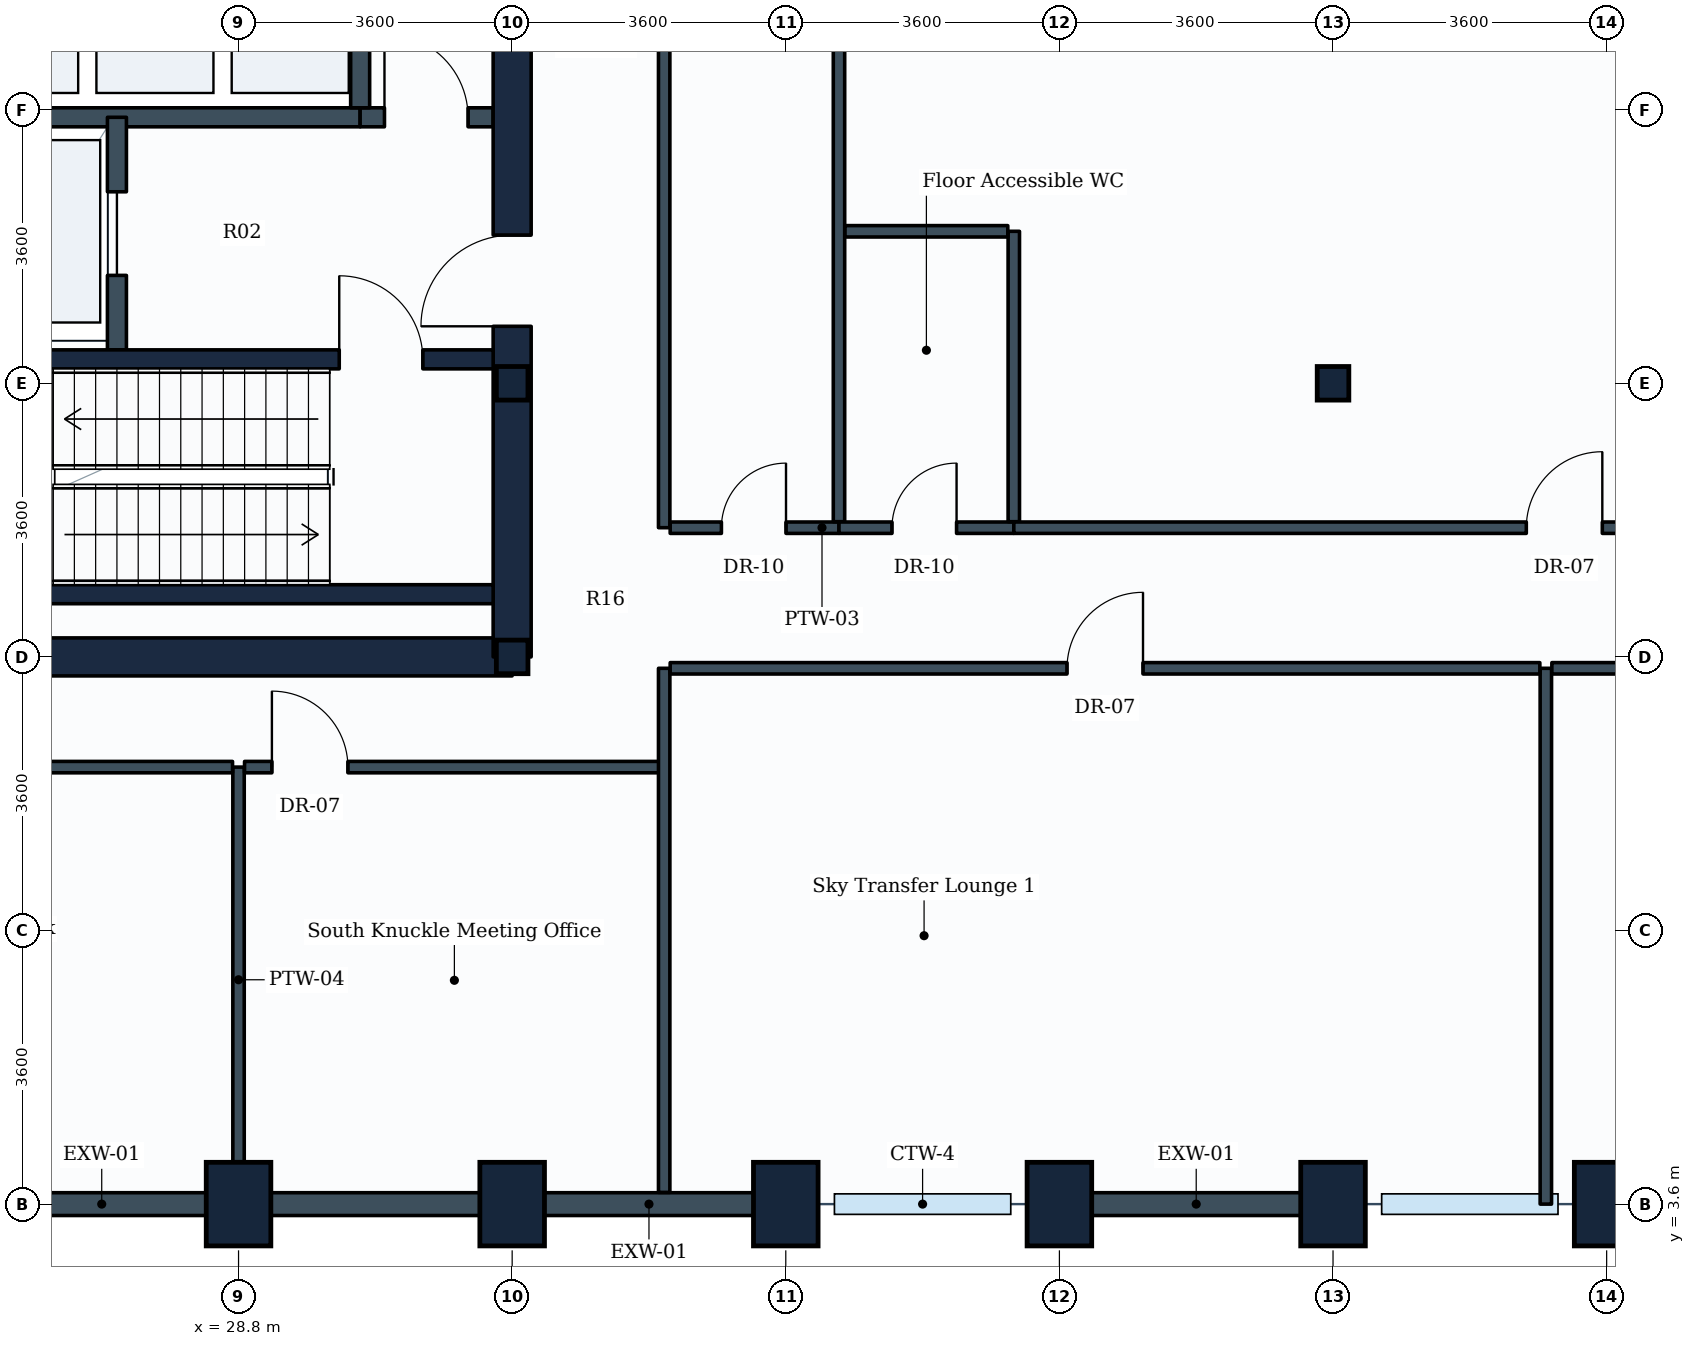
"""IFC4 building model, lengths in metres.
Left out: names, types, materials, properties, quantities, classifications, styles, units other than length and angle.
Written with IfcOpenShell. Run it as: python <this file> out.ifc"""

import sys

from ifc_helpers import new_model, si_unit, direction, frame, frame_2d, origin, origin_2d, place, context, subcontext, project, spatial, rectangle, i_section, extrude, element, fill, save


model = new_model("IFC4")
c1 = context("Model", 3, precision=1e-05, world=origin(), true_north=direction((0.0, 1.0)))
c2 = subcontext(c1, "Body", "Model", "MODEL_VIEW")
j1 = project(units=[si_unit("LENGTHUNIT", "METRE"), si_unit("PLANEANGLEUNIT", "RADIAN")], contexts=[c1])
p1 = place(None, origin())
s1 = spatial("IfcSite", under=j1, at=p1, CompositionType="ELEMENT")
p2 = place(p1, origin())
s2 = spatial("IfcBuilding", under=s1, at=p2, CompositionType="ELEMENT")
p3 = place(p2, frame((0.0, 0.0, 115.2)))
s3 = spatial("IfcBuildingStorey", under=s2, at=p3, CompositionType="ELEMENT", Elevation=115.2)
for number, where, z_axis, x_axis in (
    (1, (28.8, 3.6, 0.0), (0.0, 0.0, 1.0), (1.0, 0.0, 0.0)),
    (2, (32.4, 3.6, 0.0), (0.0, 0.0, 1.0), (1.0, 0.0, 0.0)),
):
    element("IfcColumn", number, at=place(p3, frame(where, z_axis=z_axis, x_axis=x_axis)), inside=s3, PredefinedType="COLUMN", context=c2, shape_type="SweptSolid", body=[
        extrude(rectangle(XDim=0.85, YDim=1.1, at=origin_2d()), origin(), (0.0, 0.0, 1.0), 4.8),
    ])
for number, where, z_axis, x_axis in (
    (3, (32.4, 10.8, 0.0), (0.0, 0.0, 1.0), (1.0, 0.0, 0.0)),
    (4, (32.4, 14.4, 0.0), (0.0, 0.0, 1.0), (1.0, 0.0, 0.0)),
):
    element("IfcColumn", number, at=place(p3, frame(where, z_axis=z_axis, x_axis=x_axis)), inside=s3, PredefinedType="COLUMN", context=c2, shape_type="SweptSolid", body=[
        extrude(i_section(OverallWidth=0.416, OverallDepth=0.442, WebThickness=0.025, FlangeThickness=0.041, FilletRadius=0.015, at=origin_2d()), origin(), (0.0, 0.0, 1.0), 4.8),
    ])
for number, where, z_axis, x_axis in (
    (5, (36.0, 3.6, 0.0), (0.0, 0.0, 1.0), (1.0, 0.0, 0.0)),
    (6, (39.6, 3.6, 0.0), (0.0, 0.0, 1.0), (1.0, 0.0, 0.0)),
    (7, (43.2, 3.6, 0.0), (0.0, 0.0, 1.0), (1.0, 0.0, 0.0)),
):
    element("IfcColumn", number, at=place(p3, frame(where, z_axis=z_axis, x_axis=x_axis)), inside=s3, PredefinedType="COLUMN", context=c2, shape_type="SweptSolid", body=[
        extrude(rectangle(XDim=0.85, YDim=1.1, at=origin_2d()), origin(), (0.0, 0.0, 1.0), 4.8),
    ])
p4 = place(p3, frame((43.2, 14.4, 0.0), z_axis=(0.0, 0.0, 1.0), x_axis=(1.0, 0.0, 0.0)))
e8 = element("IfcColumn", 8, at=p4, inside=s3, PredefinedType="COLUMN", context=c2, shape_type="SweptSolid", body=[
    extrude(i_section(OverallWidth=0.416, OverallDepth=0.442, WebThickness=0.025, FlangeThickness=0.041, FilletRadius=0.015, at=origin_2d()), origin(), (0.0, 0.0, 1.0), 4.8),
])
p5 = place(p3, frame((46.8, 3.6, 0.0), z_axis=(0.0, 0.0, 1.0), x_axis=(1.0, 0.0, 0.0)))
e9 = element("IfcColumn", 9, at=p5, inside=s3, PredefinedType="COLUMN", context=c2, shape_type="SweptSolid", body=[
    extrude(rectangle(XDim=0.85, YDim=1.1, at=origin_2d()), origin(), (0.0, 0.0, 1.0), 4.8),
])
p6 = place(p3, frame((28.8, 3.6, 0.0), z_axis=(0.0, 0.0, 1.0), x_axis=(-1.0, 0.0, 0.0)))
e10 = element("IfcWall", 10, at=p6, inside=s3, PredefinedType="STANDARD", context=c2, shape_type="SweptSolid", body=[
    extrude(rectangle(XDim=3.6, YDim=0.3, at=frame_2d((1.8, 0.0))), origin(), (0.0, 0.0, 1.0), 3.93),
])
p7 = place(p3, frame((32.4, 3.6, 0.0), z_axis=(0.0, 0.0, 1.0), x_axis=(-1.0, 0.0, 0.0)))
e11 = element("IfcWall", 11, at=p7, inside=s3, PredefinedType="STANDARD", context=c2, shape_type="SweptSolid", body=[
    extrude(rectangle(XDim=3.6, YDim=0.3, at=frame_2d((1.8, 0.0))), origin(), (0.0, 0.0, 1.0), 3.93),
])
p8 = place(p3, frame((36.0, 3.6, 0.0), z_axis=(0.0, 0.0, 1.0), x_axis=(-1.0, 0.0, 0.0)))
e12 = element("IfcWall", 12, at=p8, inside=s3, PredefinedType="STANDARD", context=c2, shape_type="SweptSolid", body=[
    extrude(rectangle(XDim=3.6, YDim=0.3, at=frame_2d((1.8, 0.0))), origin(), (0.0, 0.0, 1.0), 3.93),
])
for number, where, z_axis, x_axis in (
    (13, (43.2, 3.6, 0.0), (0.0, 0.0, 1.0), (-1.0, 0.0, 0.0)),
    (14, (50.4, 3.6, 0.0), (0.0, 0.0, 1.0), (-1.0, 0.0, 0.0)),
):
    element("IfcWall", number, at=place(p3, frame(where, z_axis=z_axis, x_axis=x_axis)), inside=s3, PredefinedType="STANDARD", context=c2, shape_type="SweptSolid", body=[
        extrude(rectangle(XDim=3.6, YDim=0.3, at=frame_2d((1.8, 0.0))), origin(), (0.0, 0.0, 1.0), 3.93),
    ])
p9 = place(p3, frame((14.4, 10.8, 0.0), z_axis=(0.0, 0.0, 1.0), x_axis=(1.0, 0.0, 0.0)))
e15 = element("IfcWall", 15, at=p9, inside=s3, PredefinedType="SHEAR", context=c2, shape_type="SweptSolid", body=[
    extrude(rectangle(XDim=18.0, YDim=0.5, at=frame_2d((9.0, 0.0))), origin(), (0.0, 0.0, 1.0), 4.55),
])
p10 = place(p3, frame((32.4, 10.8, 0.0), z_axis=(0.0, 0.0, 1.0), x_axis=(0.0, 1.0, 0.0)))
e16 = element("IfcWall", 16, at=p10, inside=s3, PredefinedType="SHEAR", context=c2, shape_type="SweptSolid", body=[
    extrude(rectangle(XDim=14.4, YDim=0.5, at=frame_2d((7.2, 0.0))), origin(), (0.0, 0.0, 1.0), 4.55),
])
p11 = place(p10, frame((4.35, 0.0, 0.0)))
e17 = element("IfcOpeningElement", 17, at=p11, cuts=e16, PredefinedType="OPENING", context=c2, shape_type="SweptSolid", body=[
    extrude(rectangle(XDim=1.2, YDim=2.1, at=frame_2d((0.6, 1.05))), frame((0.0, 0.26, 0.0), z_axis=(0.0, -1.0, 0.0), x_axis=(1.0, 0.0, 0.0)), (0.0, 0.0, 1.0), 0.52),
])
p12 = place(p10, frame((10.0, 0.0, 0.0)))
e18 = element("IfcOpeningElement", 18, at=p12, cuts=e16, PredefinedType="OPENING", context=c2, shape_type="SweptSolid", body=[
    extrude(rectangle(XDim=1.2, YDim=2.1, at=frame_2d((0.6, 1.05))), frame((0.0, 0.26, 0.0), z_axis=(0.0, -1.0, 0.0), x_axis=(1.0, 0.0, 0.0)), (0.0, 0.0, 1.0), 0.52),
])
p13 = place(p3, frame((23.35, 11.625, 0.0), z_axis=(0.0, 0.0, 1.0), x_axis=(1.0, 0.0, 0.0)))
e19 = element("IfcWall", 19, at=p13, inside=s3, PredefinedType="SHEAR", context=c2, shape_type="SweptSolid", body=[
    extrude(rectangle(XDim=8.8, YDim=0.25, at=frame_2d((4.4, 0.0))), origin(), (0.0, 0.0, 1.0), 4.55),
])
p14 = place(p3, frame((23.35, 14.715, 0.0), z_axis=(0.0, 0.0, 1.0), x_axis=(1.0, 0.0, 0.0)))
e20 = element("IfcWall", 20, at=p14, inside=s3, PredefinedType="SHEAR", context=c2, shape_type="SweptSolid", body=[
    extrude(rectangle(XDim=8.8, YDim=0.25, at=frame_2d((4.4, 0.0))), origin(), (0.0, 0.0, 1.0), 4.55),
])
p15 = place(p14, frame((6.775, 0.0, 0.0)))
e21 = element("IfcOpeningElement", 21, at=p15, cuts=e20, PredefinedType="OPENING", context=c2, shape_type="SweptSolid", body=[
    extrude(rectangle(XDim=1.1, YDim=2.1, at=frame_2d((0.55, 1.05))), frame((0.0, 0.135, 0.0), z_axis=(0.0, -1.0, 0.0), x_axis=(1.0, 0.0, 0.0)), (0.0, 0.0, 1.0), 0.27),
])
p16 = place(p3, frame((21.88, 17.9, 0.0), z_axis=(0.0, 0.0, 1.0), x_axis=(1.0, 0.0, 0.0)))
e22 = element("IfcWall", 22, at=p16, inside=s3, PredefinedType="PARTITIONING", context=c2, shape_type="SweptSolid", body=[
    extrude(rectangle(XDim=8.52, YDim=0.25, at=frame_2d((4.26, 0.0))), origin(), (0.0, 0.0, 1.0), 4.535),
])
p17 = place(p3, frame((30.4, 17.9, 0.0), z_axis=(0.0, 0.0, 1.0), x_axis=(1.0, 0.0, 0.0)))
e23 = element("IfcWall", 23, at=p17, inside=s3, PredefinedType="PARTITIONING", context=c2, shape_type="SweptSolid", body=[
    extrude(rectangle(XDim=1.75, YDim=0.25, at=frame_2d((0.875, 0.0))), origin(), (0.0, 0.0, 1.0), 4.535),
])
p18 = place(p17, frame((0.32, 0.0, 0.0)))
e24 = element("IfcOpeningElement", 24, at=p18, cuts=e23, PredefinedType="OPENING", context=c2, shape_type="SweptSolid", body=[
    extrude(rectangle(XDim=1.1, YDim=2.1, at=frame_2d((0.55, 1.05))), frame((0.0, 0.135, 0.0), z_axis=(0.0, -1.0, 0.0), x_axis=(1.0, 0.0, 0.0)), (0.0, 0.0, 1.0), 0.27),
])
p19 = place(p3, frame((27.2, 14.84, 0.0), z_axis=(0.0, 0.0, 1.0), x_axis=(0.0, 1.0, 0.0)))
e25 = element("IfcWall", 25, at=p19, inside=s3, PredefinedType="PARTITIONING", context=c2, shape_type="SweptSolid", body=[
    extrude(rectangle(XDim=3.06, YDim=0.25, at=frame_2d((1.53, 0.0))), origin(), (0.0, 0.0, 1.0), 4.535),
])
p20 = place(p19, frame((0.98, 0.0, 0.0)))
e26 = element("IfcOpeningElement", 26, at=p20, cuts=e25, PredefinedType="OPENING", context=c2, shape_type="SweptSolid", body=[
    extrude(rectangle(XDim=1.1, YDim=2.1, at=frame_2d((0.55, 1.05))), frame((0.0, 0.135, 0.0), z_axis=(0.0, -1.0, 0.0), x_axis=(1.0, 0.0, 0.0)), (0.0, 0.0, 1.0), 0.27),
])
p21 = place(p3, frame((30.4, 18.025, 0.0), z_axis=(0.0, 0.0, 1.0), x_axis=(0.0, 1.0, 0.0)))
e27 = element("IfcWall", 27, at=p21, inside=s3, PredefinedType="PARTITIONING", context=c2, shape_type="SweptSolid", body=[
    extrude(rectangle(XDim=2.27, YDim=0.25, at=frame_2d((1.135, 0.0))), origin(), (0.0, 0.0, 1.0), 4.535),
])
p22 = place(p3, frame((34.4, 12.5, 0.0), z_axis=(0.0, 0.0, 1.0), x_axis=(0.0, 1.0, 0.0)))
e28 = element("IfcWall", 28, at=p22, inside=s3, PredefinedType="PARTITIONING", context=c2, shape_type="SweptSolid", body=[
    extrude(rectangle(XDim=12.7, YDim=0.15, at=frame_2d((6.35, 0.0))), origin(), (0.0, 0.0, 1.0), 3.93),
])
p23 = place(p3, frame((34.479, 12.5, 0.0), z_axis=(0.0, 0.0, 1.0), x_axis=(1.0, 0.0, 0.0)))
e29 = element("IfcWall", 29, at=p23, inside=s3, PredefinedType="PARTITIONING", context=c2, shape_type="SweptSolid", body=[
    extrude(rectangle(XDim=2.221, YDim=0.15, at=frame_2d((1.11, 0.0))), origin(), (0.0, 0.0, 1.0), 4.08),
])
p24 = place(p23, frame((0.674, 0.0, 0.0)))
e30 = element("IfcOpeningElement", 30, at=p24, cuts=e29, PredefinedType="OPENING", context=c2, shape_type="SweptSolid", body=[
    extrude(rectangle(XDim=0.85, YDim=2.1, at=frame_2d((0.425, 1.05))), frame((0.0, 0.085, 0.0), z_axis=(0.0, -1.0, 0.0), x_axis=(1.0, 0.0, 0.0)), (0.0, 0.0, 1.0), 0.17),
])
p25 = place(p3, frame((36.7, 12.579, 0.0), z_axis=(0.0, 0.0, 1.0), x_axis=(0.0, 1.0, 0.0)))
e31 = element("IfcWall", 31, at=p25, inside=s3, PredefinedType="PARTITIONING", context=c2, shape_type="SweptSolid", body=[
    extrude(rectangle(XDim=12.467, YDim=0.15, at=frame_2d((6.233, 0.0))), origin(), (0.0, 0.0, 1.0), 3.93),
])
p26 = place(p3, frame((36.7, 12.5, 0.0), z_axis=(0.0, 0.0, 1.0), x_axis=(1.0, 0.0, 0.0)))
e32 = element("IfcWall", 32, at=p26, inside=s3, PredefinedType="PARTITIONING", context=c2, shape_type="SweptSolid", body=[
    extrude(rectangle(XDim=2.3, YDim=0.15, at=frame_2d((1.15, 0.0))), origin(), (0.0, 0.0, 1.0), 4.535),
])
p27 = place(p26, frame((0.697, 0.0, 0.0)))
e33 = element("IfcOpeningElement", 33, at=p27, cuts=e32, PredefinedType="OPENING", context=c2, shape_type="SweptSolid", body=[
    extrude(rectangle(XDim=0.85, YDim=2.1, at=frame_2d((0.425, 1.05))), frame((0.0, 0.085, 0.0), z_axis=(0.0, -1.0, 0.0), x_axis=(1.0, 0.0, 0.0)), (0.0, 0.0, 1.0), 0.17),
])
p28 = place(p3, frame((39.0, 12.579, 0.0), z_axis=(0.0, 0.0, 1.0), x_axis=(0.0, 1.0, 0.0)))
e34 = element("IfcWall", 34, at=p28, inside=s3, PredefinedType="PARTITIONING", context=c2, shape_type="SweptSolid", body=[
    extrude(rectangle(XDim=3.821, YDim=0.15, at=frame_2d((1.91, 0.0))), origin(), (0.0, 0.0, 1.0), 4.08),
])
p29 = place(p3, frame((36.779, 16.4, 0.0), z_axis=(0.0, 0.0, 1.0), x_axis=(1.0, 0.0, 0.0)))
e35 = element("IfcWall", 35, at=p29, inside=s3, PredefinedType="PARTITIONING", context=c2, shape_type="SweptSolid", body=[
    extrude(rectangle(XDim=2.142, YDim=0.15, at=frame_2d((1.071, 0.0))), origin(), (0.0, 0.0, 1.0), 4.535),
])
p30 = place(p3, frame((28.8, 9.35, 0.0), z_axis=(0.0, 0.0, 1.0), x_axis=(0.0, -1.0, 0.0)))
e36 = element("IfcWall", 36, at=p30, inside=s3, PredefinedType="PARTITIONING", context=c2, shape_type="SweptSolid", body=[
    extrude(rectangle(XDim=5.596, YDim=0.15, at=frame_2d((2.798, 0.0))), origin(), (0.0, 0.0, 1.0), 4.535),
])
p31 = place(p3, frame((13.08, 9.35, 0.0), z_axis=(0.0, 0.0, 1.0), x_axis=(1.0, 0.0, 0.0)))
e37 = element("IfcWall", 37, at=p31, inside=s3, PredefinedType="PARTITIONING", context=c2, shape_type="SweptSolid", body=[
    extrude(rectangle(XDim=15.641, YDim=0.15, at=frame_2d((7.82, 0.0))), origin(), (0.0, 0.0, 1.0), 4.08),
])
p32 = place(p31, frame((4.706, 0.0, 0.0)))
e38 = element("IfcOpeningElement", 38, at=p32, cuts=e37, PredefinedType="OPENING", context=c2, shape_type="SweptSolid", body=[
    extrude(rectangle(XDim=1.0, YDim=2.1, at=frame_2d((0.5, 1.05))), frame((0.0, 0.085, 0.0), z_axis=(0.0, -1.0, 0.0), x_axis=(1.0, 0.0, 0.0)), (0.0, 0.0, 1.0), 0.17),
])
p33 = place(p3, frame((28.879, 9.35, 0.0), z_axis=(0.0, 0.0, 1.0), x_axis=(1.0, 0.0, 0.0)))
e39 = element("IfcWall", 39, at=p33, inside=s3, PredefinedType="PARTITIONING", context=c2, shape_type="SweptSolid", body=[
    extrude(rectangle(XDim=5.521, YDim=0.15, at=frame_2d((2.76, 0.0))), origin(), (0.0, 0.0, 1.0), 4.535),
])
p34 = place(p33, frame((0.36, 0.0, 0.0)))
e40 = element("IfcOpeningElement", 40, at=p34, cuts=e39, PredefinedType="OPENING", context=c2, shape_type="SweptSolid", body=[
    extrude(rectangle(XDim=1.0, YDim=2.1, at=frame_2d((0.5, 1.05))), frame((0.0, 0.085, 0.0), z_axis=(0.0, -1.0, 0.0), x_axis=(1.0, 0.0, 0.0)), (0.0, 0.0, 1.0), 0.17),
])
p35 = place(p3, frame((34.4, 3.754, 0.0), z_axis=(0.0, 0.0, 1.0), x_axis=(0.0, 1.0, 0.0)))
e41 = element("IfcWall", 41, at=p35, inside=s3, PredefinedType="PARTITIONING", context=c2, shape_type="SweptSolid", body=[
    extrude(rectangle(XDim=6.896, YDim=0.15, at=frame_2d((3.448, 0.0))), origin(), (0.0, 0.0, 1.0), 3.93),
])
p36 = place(p3, frame((46.0, 3.6, 0.0), z_axis=(0.0, 0.0, 1.0), x_axis=(0.0, 1.0, 0.0)))
e42 = element("IfcWall", 42, at=p36, inside=s3, PredefinedType="PARTITIONING", context=c2, shape_type="SweptSolid", body=[
    extrude(rectangle(XDim=7.05, YDim=0.15, at=frame_2d((3.525, 0.0))), origin(), (0.0, 0.0, 1.0), 3.93),
])
p37 = place(p3, frame((34.479, 10.65, 0.0), z_axis=(0.0, 0.0, 1.0), x_axis=(1.0, 0.0, 0.0)))
e43 = element("IfcWall", 43, at=p37, inside=s3, PredefinedType="PARTITIONING", context=c2, shape_type="SweptSolid", body=[
    extrude(rectangle(XDim=11.442, YDim=0.15, at=frame_2d((5.721, 0.0))), origin(), (0.0, 0.0, 1.0), 4.08),
])
p38 = place(p37, frame((5.221, 0.0, 0.0)))
e44 = element("IfcOpeningElement", 44, at=p38, cuts=e43, PredefinedType="OPENING", context=c2, shape_type="SweptSolid", body=[
    extrude(rectangle(XDim=1.0, YDim=2.1, at=frame_2d((0.5, 1.05))), frame((0.0, 0.085, 0.0), z_axis=(0.0, -1.0, 0.0), x_axis=(1.0, 0.0, 0.0)), (0.0, 0.0, 1.0), 0.17),
])
p39 = place(p3, frame((46.079, 10.65, 0.0), z_axis=(0.0, 0.0, 1.0), x_axis=(1.0, 0.0, 0.0)))
e45 = element("IfcWall", 45, at=p39, inside=s3, PredefinedType="PARTITIONING", context=c2, shape_type="SweptSolid", body=[
    extrude(rectangle(XDim=11.367, YDim=0.15, at=frame_2d((5.684, 0.0))), origin(), (0.0, 0.0, 1.0), 3.93),
])
p40 = place(p39, frame((5.221, 0.0, 0.0)))
e46 = element("IfcOpeningElement", 46, at=p40, cuts=e45, PredefinedType="OPENING", context=c2, shape_type="SweptSolid", body=[
    extrude(rectangle(XDim=1.0, YDim=2.1, at=frame_2d((0.5, 1.05))), frame((0.0, 0.085, 0.0), z_axis=(0.0, -1.0, 0.0), x_axis=(1.0, 0.0, 0.0)), (0.0, 0.0, 1.0), 0.17),
])
p41 = place(p3, frame((39.0, 12.5, 0.0), z_axis=(0.0, 0.0, 1.0), x_axis=(1.0, 0.0, 0.0)))
e47 = element("IfcWall", 47, at=p41, inside=s3, PredefinedType="PARTITIONING", context=c2, shape_type="SweptSolid", body=[
    extrude(rectangle(XDim=9.221, YDim=0.15, at=frame_2d((4.61, 0.0))), origin(), (0.0, 0.0, 1.0), 4.09),
])
p42 = place(p41, frame((6.743, 0.0, 0.0)))
e48 = element("IfcOpeningElement", 48, at=p42, cuts=e47, PredefinedType="OPENING", context=c2, shape_type="SweptSolid", body=[
    extrude(rectangle(XDim=1.0, YDim=2.1, at=frame_2d((0.5, 1.05))), frame((0.0, 0.085, 0.0), z_axis=(0.0, -1.0, 0.0), x_axis=(1.0, 0.0, 0.0)), (0.0, 0.0, 1.0), 0.17),
])
p43 = place(p15, origin())
e49 = element("IfcDoor", 49, at=p43, inside=s3, OperationType="SINGLE_SWING_LEFT", PredefinedType="DOOR", context=c2, shape_type="SweptSolid", body=[
    extrude(rectangle(XDim=1.1, YDim=2.1, at=frame_2d((0.55, 1.05))), frame((0.0, 0.025, 0.0), z_axis=(0.0, -1.0, 0.0), x_axis=(1.0, 0.0, 0.0)), (0.0, 0.0, 1.0), 0.05),
])
fill(e21, e49)
p44 = place(p20, origin())
e50 = element("IfcDoor", 50, at=p44, inside=s3, OperationType="SLIDING_TO_LEFT", PredefinedType="DOOR", context=c2, shape_type="SweptSolid", body=[
    extrude(rectangle(XDim=1.1, YDim=2.1, at=frame_2d((0.55, 1.05))), frame((0.0, 0.025, 0.0), z_axis=(0.0, -1.0, 0.0), x_axis=(1.0, 0.0, 0.0)), (0.0, 0.0, 1.0), 0.05),
])
fill(e26, e50)
p45 = place(p11, origin())
e51 = element("IfcDoor", 51, at=p45, inside=s3, OperationType="SINGLE_SWING_LEFT", PredefinedType="DOOR", context=c2, shape_type="SweptSolid", body=[
    extrude(rectangle(XDim=1.2, YDim=2.1, at=frame_2d((0.6, 1.05))), frame((0.0, 0.025, 0.0), z_axis=(0.0, -1.0, 0.0), x_axis=(1.0, 0.0, 0.0)), (0.0, 0.0, 1.0), 0.05),
])
fill(e17, e51)
p46 = place(p18, origin())
e52 = element("IfcDoor", 52, at=p46, inside=s3, OperationType="SINGLE_SWING_LEFT", PredefinedType="DOOR", context=c2, shape_type="SweptSolid", body=[
    extrude(rectangle(XDim=1.1, YDim=2.1, at=frame_2d((0.55, 1.05))), frame((0.0, 0.025, 0.0), z_axis=(0.0, -1.0, 0.0), x_axis=(1.0, 0.0, 0.0)), (0.0, 0.0, 1.0), 0.05),
])
fill(e24, e52)
p47 = place(p24, origin())
e53 = element("IfcDoor", 53, at=p47, inside=s3, OperationType="SINGLE_SWING_RIGHT", PredefinedType="DOOR", context=c2, shape_type="SweptSolid", body=[
    extrude(rectangle(XDim=0.85, YDim=2.1, at=frame_2d((0.425, 1.05))), frame((0.0, 0.025, 0.0), z_axis=(0.0, -1.0, 0.0), x_axis=(1.0, 0.0, 0.0)), (0.0, 0.0, 1.0), 0.05),
])
fill(e30, e53)
p48 = place(p27, origin())
e54 = element("IfcDoor", 54, at=p48, inside=s3, OperationType="SINGLE_SWING_RIGHT", PredefinedType="DOOR", context=c2, shape_type="SweptSolid", body=[
    extrude(rectangle(XDim=0.85, YDim=2.1, at=frame_2d((0.425, 1.05))), frame((0.0, 0.025, 0.0), z_axis=(0.0, -1.0, 0.0), x_axis=(1.0, 0.0, 0.0)), (0.0, 0.0, 1.0), 0.05),
])
fill(e33, e54)
p49 = place(p34, origin())
e55 = element("IfcDoor", 55, at=p49, inside=s3, OperationType="SINGLE_SWING_LEFT", PredefinedType="DOOR", context=c2, shape_type="SweptSolid", body=[
    extrude(rectangle(XDim=1.0, YDim=2.1, at=frame_2d((0.5, 1.05))), frame((0.0, 0.025, 0.0), z_axis=(0.0, -1.0, 0.0), x_axis=(1.0, 0.0, 0.0)), (0.0, 0.0, 1.0), 0.05),
])
fill(e40, e55)
p50 = place(p38, origin())
e56 = element("IfcDoor", 56, at=p50, inside=s3, OperationType="SINGLE_SWING_RIGHT", PredefinedType="DOOR", context=c2, shape_type="SweptSolid", body=[
    extrude(rectangle(XDim=1.0, YDim=2.1, at=frame_2d((0.5, 1.05))), frame((0.0, 0.025, 0.0), z_axis=(0.0, -1.0, 0.0), x_axis=(1.0, 0.0, 0.0)), (0.0, 0.0, 1.0), 0.05),
])
fill(e44, e56)
p51 = place(p42, origin())
e57 = element("IfcDoor", 57, at=p51, inside=s3, OperationType="SINGLE_SWING_RIGHT", PredefinedType="DOOR", context=c2, shape_type="SweptSolid", body=[
    extrude(rectangle(XDim=1.0, YDim=2.1, at=frame_2d((0.5, 1.05))), frame((0.0, 0.025, 0.0), z_axis=(0.0, -1.0, 0.0), x_axis=(1.0, 0.0, 0.0)), (0.0, 0.0, 1.0), 0.05),
])
fill(e48, e57)
save(model, sys.argv[1])
